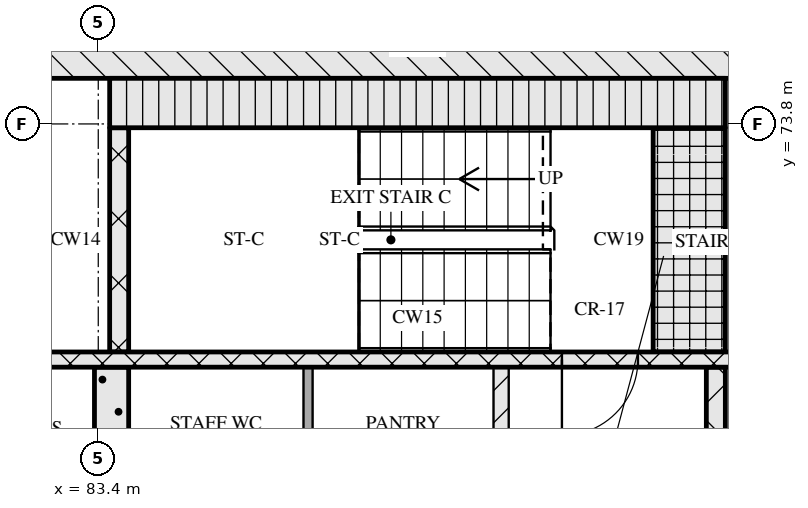
"""IFC4 building model, lengths in metres.
Left out: names, types, materials, properties, quantities, classifications, styles, units other than length and angle.
Written with IfcOpenShell. Run it as: python <this file> out.ifc"""

import sys

from ifc_helpers import new_model, si_unit, direction, frame, frame_2d, origin, place, context, subcontext, project, spatial, rectangle, extrude, element, fill, save


model = new_model("IFC4")
c1 = context("Model", 3, precision=1e-05, world=origin(), true_north=direction((0.0, 1.0)))
c2 = subcontext(c1, "Body", "Model", "MODEL_VIEW")
j1 = project(units=[si_unit("LENGTHUNIT", "METRE"), si_unit("PLANEANGLEUNIT", "RADIAN")], contexts=[c1])
p1 = place(None, origin())
s1 = spatial("IfcSite", under=j1, at=p1, CompositionType="ELEMENT")
p2 = place(p1, origin())
s2 = spatial("IfcBuilding", under=s1, at=p2, CompositionType="ELEMENT")
p3 = place(p2, frame((0.0, 0.0, 183.45)))
s3 = spatial("IfcBuildingStorey", under=s2, at=p3, CompositionType="ELEMENT", Elevation=183.45)
p4 = place(p3, frame((67.0, 74.8, 0.0), z_axis=(0.0, 0.0, 1.0), x_axis=(1.0, 0.0, 0.0)))
e1 = element("IfcWall", 1, at=p4, inside=s3, PredefinedType="SOLIDWALL", context=c2, shape_type="SweptSolid", body=[
    extrude(rectangle(XDim=41.2, YDim=0.8, at=frame_2d((20.6, 0.0))), origin(), (0.0, 0.0, 1.0), 3.32),
])
p5 = place(p3, frame((83.575, 68.0, 0.0), z_axis=(0.0, 0.0, 1.0), x_axis=(0.0, 1.0, 0.0)))
e2 = element("IfcWall", 2, at=p5, inside=s3, PredefinedType="SOLIDWALL", context=c2, shape_type="SweptSolid", body=[
    extrude(rectangle(XDim=2.6, YDim=0.45, at=frame_2d((1.3, 0.0))), origin(), (0.0, 0.0, 1.0), 3.32),
])
p6 = place(p3, frame((86.16, 68.0, 0.0), z_axis=(0.0, 0.0, 1.0), x_axis=(0.0, 1.0, 0.0)))
e3 = element("IfcWall", 3, at=p6, inside=s3, PredefinedType="PARTITIONING", context=c2, shape_type="SweptSolid", body=[
    extrude(rectangle(XDim=2.6, YDim=0.12, at=frame_2d((1.3, 0.0))), origin(), (0.0, 0.0, 1.0), 3.32),
])
p7 = place(p3, frame((88.7, 68.0, 0.0), z_axis=(0.0, 0.0, 1.0), x_axis=(0.0, 1.0, 0.0)))
e4 = element("IfcWall", 4, at=p7, inside=s3, PredefinedType="PARTITIONING", context=c2, shape_type="SweptSolid", body=[
    extrude(rectangle(XDim=2.6, YDim=0.2, at=frame_2d((1.3, 0.0))), origin(), (0.0, 0.0, 1.0), 3.32),
])
p8 = place(p3, frame((91.525, 68.0, 0.0), z_axis=(0.0, 0.0, 1.0), x_axis=(0.0, 1.0, 0.0)))
e5 = element("IfcWall", 5, at=p8, inside=s3, PredefinedType="SOLIDWALL", context=c2, shape_type="SweptSolid", body=[
    extrude(rectangle(XDim=2.6, YDim=0.25, at=frame_2d((1.3, 0.0))), origin(), (0.0, 0.0, 1.0), 3.32),
])
p9 = place(p3, frame((67.8, 70.7, 0.0), z_axis=(0.0, 0.0, 1.0), x_axis=(1.0, 0.0, 0.0)))
e6 = element("IfcWall", 6, at=p9, inside=s3, PredefinedType="SOLIDWALL", context=c2, shape_type="SweptSolid", body=[
    extrude(rectangle(XDim=39.6, YDim=0.2, at=frame_2d((19.8, 0.0))), origin(), (0.0, 0.0, 1.0), 3.32),
])
p10 = place(p9, frame((0.65, 0.0, 0.0)))
e7 = element("IfcOpeningElement", 7, at=p10, cuts=e6, PredefinedType="OPENING", context=c2, shape_type="SweptSolid", body=[
    extrude(rectangle(XDim=1.1, YDim=2.1, at=frame_2d((0.55, 1.05))), frame((0.0, 0.11, 0.0), z_axis=(0.0, -1.0, 0.0), x_axis=(1.0, 0.0, 0.0)), (0.0, 0.0, 1.0), 0.22),
])
p11 = place(p9, frame((3.25, 0.0, 0.0)))
e8 = element("IfcOpeningElement", 8, at=p11, cuts=e6, PredefinedType="OPENING", context=c2, shape_type="SweptSolid", body=[
    extrude(rectangle(XDim=1.1, YDim=2.1, at=frame_2d((0.55, 1.05))), frame((0.0, 0.11, 0.0), z_axis=(0.0, -1.0, 0.0), x_axis=(1.0, 0.0, 0.0)), (0.0, 0.0, 1.0), 0.22),
])
p12 = place(p9, frame((5.9, 0.0, 0.0)))
e9 = element("IfcOpeningElement", 9, at=p12, cuts=e6, PredefinedType="OPENING", context=c2, shape_type="SweptSolid", body=[
    extrude(rectangle(XDim=1.0, YDim=2.1, at=frame_2d((0.5, 1.05))), frame((0.0, 0.11, 0.0), z_axis=(0.0, -1.0, 0.0), x_axis=(1.0, 0.0, 0.0)), (0.0, 0.0, 1.0), 0.22),
])
p13 = place(p9, frame((21.7, 0.0, 0.0)))
e10 = element("IfcOpeningElement", 10, at=p13, cuts=e6, PredefinedType="OPENING", context=c2, shape_type="SweptSolid", body=[
    extrude(rectangle(XDim=1.0, YDim=2.1, at=frame_2d((0.5, 1.05))), frame((0.0, 0.11, 0.0), z_axis=(0.0, -1.0, 0.0), x_axis=(1.0, 0.0, 0.0)), (0.0, 0.0, 1.0), 0.22),
])
p14 = place(p9, frame((32.7, 0.0, 0.0)))
e11 = element("IfcOpeningElement", 11, at=p14, cuts=e6, PredefinedType="OPENING", context=c2, shape_type="SweptSolid", body=[
    extrude(rectangle(XDim=1.0, YDim=2.1, at=frame_2d((0.5, 1.05))), frame((0.0, 0.11, 0.0), z_axis=(0.0, -1.0, 0.0), x_axis=(1.0, 0.0, 0.0)), (0.0, 0.0, 1.0), 0.22),
])
p15 = place(p9, frame((35.25, 0.0, 0.0)))
e12 = element("IfcOpeningElement", 12, at=p15, cuts=e6, PredefinedType="OPENING", context=c2, shape_type="SweptSolid", body=[
    extrude(rectangle(XDim=1.1, YDim=2.1, at=frame_2d((0.55, 1.05))), frame((0.0, 0.11, 0.0), z_axis=(0.0, -1.0, 0.0), x_axis=(1.0, 0.0, 0.0)), (0.0, 0.0, 1.0), 0.22),
])
p16 = place(p9, frame((37.85, 0.0, 0.0)))
e13 = element("IfcOpeningElement", 13, at=p16, cuts=e6, PredefinedType="OPENING", context=c2, shape_type="SweptSolid", body=[
    extrude(rectangle(XDim=1.1, YDim=2.1, at=frame_2d((0.55, 1.05))), frame((0.0, 0.11, 0.0), z_axis=(0.0, -1.0, 0.0), x_axis=(1.0, 0.0, 0.0)), (0.0, 0.0, 1.0), 0.22),
])
p17 = place(p3, frame((83.675, 70.8, 0.0), z_axis=(0.0, 0.0, 1.0), x_axis=(0.0, 1.0, 0.0)))
e14 = element("IfcWall", 14, at=p17, inside=s3, PredefinedType="SOLIDWALL", context=c2, shape_type="SweptSolid", body=[
    extrude(rectangle(XDim=2.95, YDim=0.25, at=frame_2d((1.475, 0.0))), origin(), (0.0, 0.0, 1.0), 3.32),
])
p18 = place(p3, frame((91.175, 70.8, 0.0), z_axis=(0.0, 0.0, 1.0), x_axis=(0.0, 1.0, 0.0)))
e15 = element("IfcWall", 15, at=p18, inside=s3, PredefinedType="SOLIDWALL", context=c2, shape_type="SweptSolid", body=[
    extrude(rectangle(XDim=2.95, YDim=0.95, at=frame_2d((1.475, 0.0))), origin(), (0.0, 0.0, 1.0), 3.32),
])
p19 = place(p3, frame((83.55, 74.075, 0.0), z_axis=(0.0, 0.0, 1.0), x_axis=(1.0, 0.0, 0.0)))
e16 = element("IfcWall", 16, at=p19, inside=s3, PredefinedType="SOLIDWALL", context=c2, shape_type="SweptSolid", body=[
    extrude(rectangle(XDim=8.1, YDim=0.65, at=frame_2d((4.05, 0.0))), origin(), (0.0, 0.0, 1.0), 3.32),
])
p20 = place(p13, origin())
e17 = element("IfcDoor", 17, at=p20, inside=s3, OperationType="SINGLE_SWING_RIGHT", PredefinedType="DOOR", context=c2, shape_type="SweptSolid", body=[
    extrude(rectangle(XDim=1.0, YDim=2.1, at=frame_2d((0.5, 1.05))), frame((0.0, 0.025, 0.0), z_axis=(0.0, -1.0, 0.0), x_axis=(1.0, 0.0, 0.0)), (0.0, 0.0, 1.0), 0.05),
])
fill(e10, e17)
save(model, sys.argv[1])
